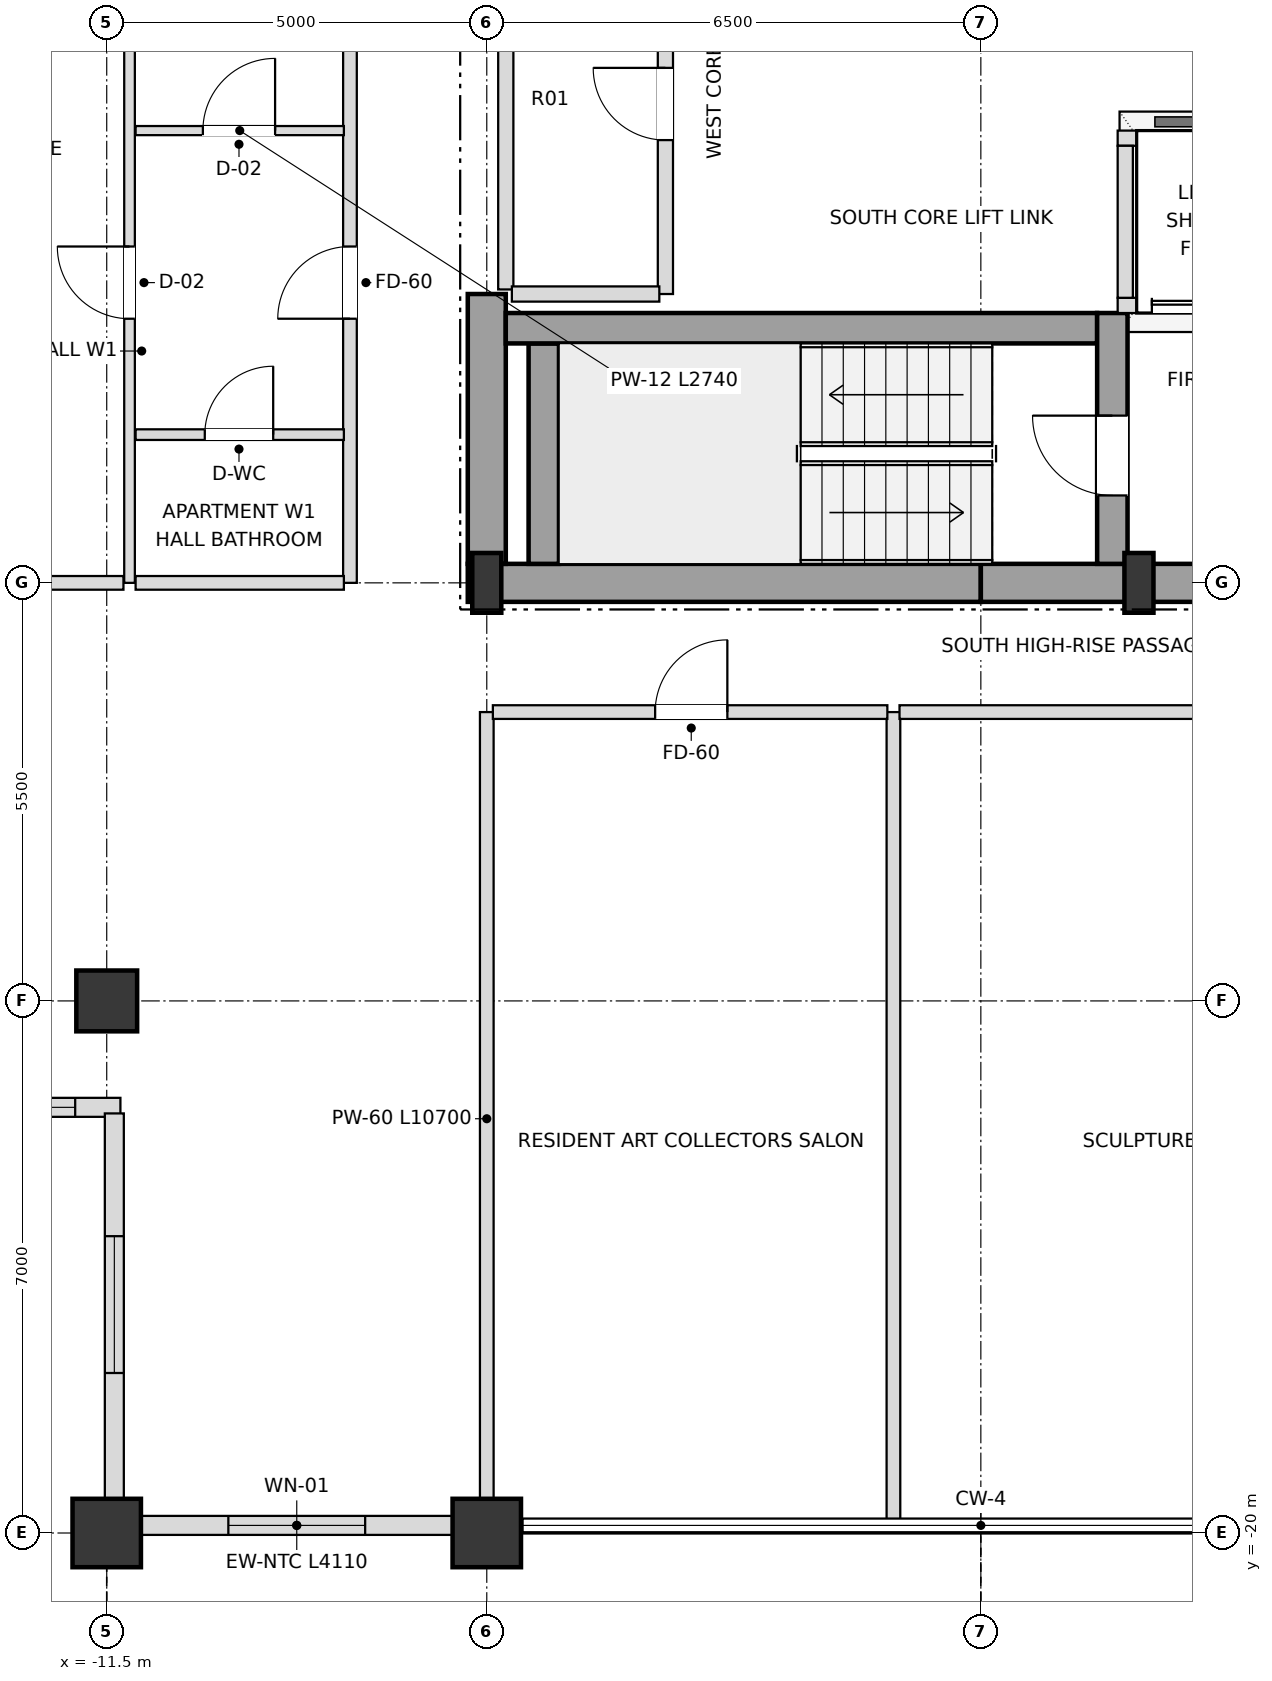
"""IFC4 building model, lengths in metres.
Left out: names, types, materials, properties, quantities, classifications, styles, units other than length and angle.
Written with IfcOpenShell. Run it as: python <this file> out.ifc"""

import sys

from ifc_helpers import new_model, si_unit, direction, frame, frame_2d, origin, origin_2d, place, context, subcontext, project, spatial, rectangle, i_section, extrude, element, fill, save


model = new_model("IFC4")
c1 = context("Model", 3, precision=1e-05, world=origin(), true_north=direction((0.0, 1.0)))
c2 = subcontext(c1, "Body", "Model", "MODEL_VIEW")
j1 = project(units=[si_unit("LENGTHUNIT", "METRE"), si_unit("PLANEANGLEUNIT", "RADIAN")], contexts=[c1])
p1 = place(None, origin())
s1 = spatial("IfcSite", under=j1, at=p1, CompositionType="ELEMENT")
p2 = place(p1, origin())
s2 = spatial("IfcBuilding", under=s1, at=p2, CompositionType="ELEMENT")
p3 = place(p2, frame((0.0, 0.0, 294.3)))
s3 = spatial("IfcBuildingStorey", under=s2, at=p3, CompositionType="ELEMENT", Elevation=294.3)
for number, where, z_axis, x_axis in (
    (1, (-6.5, -7.5, 0.0), (0.0, 0.0, 1.0), (1.0, 0.0, 0.0)),
    (2, (2.08, -7.5, 0.0), (0.0, 0.0, 1.0), (1.0, 0.0, 0.0)),
):
    element("IfcColumn", number, at=place(p3, frame(where, z_axis=z_axis, x_axis=x_axis)), inside=s3, PredefinedType="COLUMN", context=c2, shape_type="SweptSolid", body=[
        extrude(i_section(OverallWidth=0.382, OverallDepth=0.786, WebThickness=0.02, FlangeThickness=0.033, at=origin_2d()), origin(), (0.0, 0.0, 1.0), 3.6),
    ])
for number, where, z_axis, x_axis in (
    (3, (-11.5, -20.0, 0.0), (0.0, 0.0, 1.0), (1.0, 0.0, 0.0)),
    (4, (-6.5, -20.0, 0.0), (0.0, 0.0, 1.0), (1.0, 0.0, 0.0)),
):
    element("IfcColumn", number, at=place(p3, frame(where, z_axis=z_axis, x_axis=x_axis)), inside=s3, PredefinedType="USERDEFINED", context=c2, shape_type="SweptSolid", body=[
        extrude(rectangle(XDim=0.9, YDim=0.9, at=origin_2d()), origin(), (0.0, 0.0, 1.0), 3.6),
    ])
p4 = place(p3, frame((-11.5, -13.0, 0.0), z_axis=(0.0, 0.0, 1.0), x_axis=(1.0, 0.0, 0.0)))
e5 = element("IfcColumn", 5, at=p4, inside=s3, PredefinedType="COLUMN", context=c2, shape_type="SweptSolid", body=[
    extrude(rectangle(XDim=0.8, YDim=0.8, at=origin_2d()), origin(), (0.0, 0.0, 1.0), 3.6),
])
p5 = place(p3, frame((-11.055, -19.9, 0.0), z_axis=(0.0, 0.0, 1.0), x_axis=(1.0, 0.0, 0.0)))
e6 = element("IfcWall", 6, at=p5, inside=s3, PredefinedType="SOLIDWALL", context=c2, shape_type="SweptSolid", body=[
    extrude(rectangle(XDim=4.11, YDim=0.25, at=frame_2d((2.055, 0.0))), origin(), (0.0, 0.0, 1.0), 2.748),
])
p6 = place(p5, frame((1.155, 0.0, 0.72)))
e7 = element("IfcOpeningElement", 7, at=p6, cuts=e6, PredefinedType="OPENING", context=c2, shape_type="SweptSolid", body=[
    extrude(rectangle(XDim=1.8, YDim=1.68, at=frame_2d((0.9, 0.84))), frame((0.0, 0.135, 0.0), z_axis=(0.0, -1.0, 0.0), x_axis=(1.0, 0.0, 0.0)), (0.0, 0.0, 1.0), 0.27),
])
p7 = place(p3, frame((-16.98, -14.4, 0.0), z_axis=(0.0, 0.0, 1.0), x_axis=(1.0, 0.0, 0.0)))
e8 = element("IfcWall", 8, at=p7, inside=s3, PredefinedType="SOLIDWALL", context=c2, shape_type="SweptSolid", body=[
    extrude(rectangle(XDim=5.66, YDim=0.25, at=frame_2d((2.83, 0.0))), origin(), (0.0, 0.0, 1.0), 2.748),
])
p8 = place(p7, frame((0.595, 0.0, 0.72)))
e9 = element("IfcOpeningElement", 9, at=p8, cuts=e8, PredefinedType="OPENING", context=c2, shape_type="SweptSolid", body=[
    extrude(rectangle(XDim=1.8, YDim=1.68, at=frame_2d((0.9, 0.84))), frame((0.0, 0.135, 0.0), z_axis=(0.0, -1.0, 0.0), x_axis=(1.0, 0.0, 0.0)), (0.0, 0.0, 1.0), 0.27),
])
p9 = place(p7, frame((3.265, 0.0, 0.72)))
e10 = element("IfcOpeningElement", 10, at=p9, cuts=e8, PredefinedType="OPENING", context=c2, shape_type="SweptSolid", body=[
    extrude(rectangle(XDim=1.8, YDim=1.68, at=frame_2d((0.9, 0.84))), frame((0.0, 0.135, 0.0), z_axis=(0.0, -1.0, 0.0), x_axis=(1.0, 0.0, 0.0)), (0.0, 0.0, 1.0), 0.27),
])
p10 = place(p3, frame((-11.4, -14.48, 0.0), z_axis=(0.0, 0.0, 1.0), x_axis=(0.0, -1.0, 0.0)))
e11 = element("IfcWall", 11, at=p10, inside=s3, PredefinedType="SOLIDWALL", context=c2, shape_type="SweptSolid", body=[
    extrude(rectangle(XDim=5.34, YDim=0.25, at=frame_2d((2.67, 0.0))), origin(), (0.0, 0.0, 1.0), 2.748),
])
p11 = place(p10, frame((1.615, 0.0, 0.72)))
e12 = element("IfcOpeningElement", 12, at=p11, cuts=e11, PredefinedType="OPENING", context=c2, shape_type="SweptSolid", body=[
    extrude(rectangle(XDim=1.8, YDim=1.68, at=frame_2d((0.9, 0.84))), frame((0.0, 0.135, 0.0), z_axis=(0.0, -1.0, 0.0), x_axis=(1.0, 0.0, 0.0)), (0.0, 0.0, 1.0), 0.27),
])
for number, where, z_axis, x_axis in (
    (13, (-6.75, -7.5, 0.0), (0.0, 0.0, 1.0), (1.0, 0.0, 0.0)),
    (14, (0.0, -7.5, 0.0), (0.0, 0.0, 1.0), (1.0, 0.0, 0.0)),
):
    element("IfcWall", number, at=place(p3, frame(where, z_axis=z_axis, x_axis=x_axis)), inside=s3, PredefinedType="SHEAR", context=c2, shape_type="SweptSolid", body=[
        extrude(rectangle(XDim=6.75, YDim=0.5, at=frame_2d((3.375, 0.0))), origin(), (0.0, 0.0, 1.0), 3.38),
    ])
p12 = place(p3, frame((-6.5, -7.25, 0.0), z_axis=(0.0, 0.0, 1.0), x_axis=(0.0, 1.0, 0.0)))
e15 = element("IfcWall", 15, at=p12, inside=s3, PredefinedType="SHEAR", context=c2, shape_type="SweptSolid", body=[
    extrude(rectangle(XDim=3.55, YDim=0.5, at=frame_2d((1.775, 0.0))), origin(), (0.0, 0.0, 1.0), 3.38),
])
p13 = place(p3, frame((-5.75, -7.25, 0.0), z_axis=(0.0, 0.0, 1.0), x_axis=(0.0, 1.0, 0.0)))
e16 = element("IfcWall", 16, at=p13, inside=s3, PredefinedType="SHEAR", context=c2, shape_type="SweptSolid", body=[
    extrude(rectangle(XDim=2.9, YDim=0.4, at=frame_2d((1.45, 0.0))), origin(), (0.0, 0.0, 1.0), 3.38),
])
p14 = place(p3, frame((-6.25, -4.15, 0.0), z_axis=(0.0, 0.0, 1.0), x_axis=(1.0, 0.0, 0.0)))
e17 = element("IfcWall", 17, at=p14, inside=s3, PredefinedType="SHEAR", context=c2, shape_type="SweptSolid", body=[
    extrude(rectangle(XDim=7.78, YDim=0.4, at=frame_2d((3.89, 0.0))), origin(), (0.0, 0.0, 1.0), 3.38),
])
p15 = place(p3, frame((1.73, -7.25, 0.0), z_axis=(0.0, 0.0, 1.0), x_axis=(0.0, 1.0, 0.0)))
e18 = element("IfcWall", 18, at=p15, inside=s3, PredefinedType="SHEAR", context=c2, shape_type="SweptSolid", body=[
    extrude(rectangle(XDim=3.3, YDim=0.4, at=frame_2d((1.65, 0.0))), origin(), (0.0, 0.0, 1.0), 3.38),
])
p16 = place(p15, frame((0.9, 0.0, 0.0)))
e19 = element("IfcOpeningElement", 19, at=p16, cuts=e18, PredefinedType="OPENING", context=c2, shape_type="SweptSolid", body=[
    extrude(rectangle(XDim=1.05, YDim=2.15, at=frame_2d((0.525, 1.075))), frame((0.0, 0.21, 0.0), z_axis=(0.0, -1.0, 0.0), x_axis=(1.0, 0.0, 0.0)), (0.0, 0.0, 1.0), 0.42),
])
p17 = place(p3, frame((1.8, -3.85, 0.0), z_axis=(0.0, 0.0, 1.0), x_axis=(1.0, 0.0, 0.0)))
e20 = element("IfcWall", 20, at=p17, inside=s3, PredefinedType="SOLIDWALL", context=c2, shape_type="SweptSolid", body=[
    extrude(rectangle(XDim=4.1, YDim=0.2, at=frame_2d((2.05, 0.0))), origin(), (0.0, 0.0, 1.0), 3.38),
])
p18 = place(p17, frame((0.45, 0.0, 0.0)))
e21 = element("IfcOpeningElement", 21, at=p18, cuts=e20, PredefinedType="OPENING", context=c2, shape_type="SweptSolid", body=[
    extrude(rectangle(XDim=1.2, YDim=2.2, at=frame_2d((0.6, 1.1))), frame((0.0, 0.11, 0.0), z_axis=(0.0, -1.0, 0.0), x_axis=(1.0, 0.0, 0.0)), (0.0, 0.0, 1.0), 0.22),
])
p19 = place(p17, frame((2.45, 0.0, 0.0)))
e22 = element("IfcOpeningElement", 22, at=p19, cuts=e20, PredefinedType="OPENING", context=c2, shape_type="SweptSolid", body=[
    extrude(rectangle(XDim=1.2, YDim=2.2, at=frame_2d((0.6, 1.1))), frame((0.0, 0.11, 0.0), z_axis=(0.0, -1.0, 0.0), x_axis=(1.0, 0.0, 0.0)), (0.0, 0.0, 1.0), 0.22),
])
p20 = place(p3, frame((1.8, -1.65, 0.0), z_axis=(0.0, 0.0, 1.0), x_axis=(1.0, 0.0, 0.0)))
e23 = element("IfcWall", 23, at=p20, inside=s3, PredefinedType="SOLIDWALL", context=c2, shape_type="SweptSolid", body=[
    extrude(rectangle(XDim=4.1, YDim=0.2, at=frame_2d((2.05, 0.0))), origin(), (0.0, 0.0, 1.0), 3.38),
])
p21 = place(p3, frame((1.9, -3.75, 0.0), z_axis=(0.0, 0.0, 1.0), x_axis=(0.0, 1.0, 0.0)))
e24 = element("IfcWall", 24, at=p21, inside=s3, PredefinedType="SOLIDWALL", context=c2, shape_type="SweptSolid", body=[
    extrude(rectangle(XDim=2.0, YDim=0.2, at=frame_2d((1.0, 0.0))), origin(), (0.0, 0.0, 1.0), 3.38),
])
p22 = place(p3, frame((-11.2, -7.5, 0.0), z_axis=(0.0, 0.0, 1.0), x_axis=(0.0, 1.0, 0.0)))
e25 = element("IfcWall", 25, at=p22, inside=s3, PredefinedType="PARTITIONING", context=c2, shape_type="SweptSolid", body=[
    extrude(rectangle(XDim=15.0, YDim=0.14, at=frame_2d((7.5, 0.0))), origin(), (0.0, 0.0, 1.0), 3.38),
])
p23 = place(p22, frame((3.475, 0.0, 0.0)))
e26 = element("IfcOpeningElement", 26, at=p23, cuts=e25, PredefinedType="OPENING", context=c2, shape_type="SweptSolid", body=[
    extrude(rectangle(XDim=0.95, YDim=2.1, at=frame_2d((0.475, 1.05))), frame((0.0, 0.08, 0.0), z_axis=(0.0, -1.0, 0.0), x_axis=(1.0, 0.0, 0.0)), (0.0, 0.0, 1.0), 0.16),
])
p24 = place(p3, frame((-8.3, -7.5, 0.0), z_axis=(0.0, 0.0, 1.0), x_axis=(0.0, 1.0, 0.0)))
e27 = element("IfcWall", 27, at=p24, inside=s3, PredefinedType="PARTITIONING", context=c2, shape_type="SweptSolid", body=[
    extrude(rectangle(XDim=15.0, YDim=0.18, at=frame_2d((7.5, 0.0))), origin(), (0.0, 0.0, 1.0), 3.38),
])
p25 = place(p24, frame((3.475, 0.0, 0.0)))
e28 = element("IfcOpeningElement", 28, at=p25, cuts=e27, PredefinedType="OPENING", context=c2, shape_type="SweptSolid", body=[
    extrude(rectangle(XDim=0.95, YDim=2.15, at=frame_2d((0.475, 1.075))), frame((0.0, 0.1, 0.0), z_axis=(0.0, -1.0, 0.0), x_axis=(1.0, 0.0, 0.0)), (0.0, 0.0, 1.0), 0.2),
])
p26 = place(p3, frame((-6.5, -19.9, 0.0), z_axis=(0.0, 0.0, 1.0), x_axis=(0.0, 1.0, 0.0)))
e29 = element("IfcWall", 29, at=p26, inside=s3, PredefinedType="PARTITIONING", context=c2, shape_type="SweptSolid", body=[
    extrude(rectangle(XDim=10.7, YDim=0.18, at=frame_2d((5.35, 0.0))), origin(), (0.0, 0.0, 1.0), 2.826),
])
p27 = place(p3, frame((-6.25, -3.64, 0.0), z_axis=(0.0, 0.0, 1.0), x_axis=(0.0, 1.0, 0.0)))
e30 = element("IfcWall", 30, at=p27, inside=s3, PredefinedType="SOLIDWALL", context=c2, shape_type="SweptSolid", body=[
    extrude(rectangle(XDim=7.34, YDim=0.2, at=frame_2d((3.67, 0.0))), origin(), (0.0, 0.0, 1.0), 3.38),
])
p28 = place(p3, frame((-4.15, -3.7, 0.0), z_axis=(0.0, 0.0, 1.0), x_axis=(0.0, 1.0, 0.0)))
e31 = element("IfcWall", 31, at=p28, inside=s3, PredefinedType="SOLIDWALL", context=c2, shape_type="SweptSolid", body=[
    extrude(rectangle(XDim=7.4, YDim=0.2, at=frame_2d((3.7, 0.0))), origin(), (0.0, 0.0, 1.0), 3.38),
])
p29 = place(p28, frame((2.025, 0.0, 0.0)))
e32 = element("IfcOpeningElement", 32, at=p29, cuts=e31, PredefinedType="OPENING", context=c2, shape_type="SweptSolid", body=[
    extrude(rectangle(XDim=0.95, YDim=2.15, at=frame_2d((0.475, 1.075))), frame((0.0, 0.11, 0.0), z_axis=(0.0, -1.0, 0.0), x_axis=(1.0, 0.0, 0.0)), (0.0, 0.0, 1.0), 0.22),
])
p30 = place(p28, frame((5.775, 0.0, 0.0)))
e33 = element("IfcOpeningElement", 33, at=p30, cuts=e31, PredefinedType="OPENING", context=c2, shape_type="SweptSolid", body=[
    extrude(rectangle(XDim=0.95, YDim=2.15, at=frame_2d((0.475, 1.075))), frame((0.0, 0.11, 0.0), z_axis=(0.0, -1.0, 0.0), x_axis=(1.0, 0.0, 0.0)), (0.0, 0.0, 1.0), 0.22),
])
p31 = place(p3, frame((-1.15, -19.9, 0.0), z_axis=(0.0, 0.0, 1.0), x_axis=(0.0, 1.0, 0.0)))
e34 = element("IfcWall", 34, at=p31, inside=s3, PredefinedType="PARTITIONING", context=c2, shape_type="SweptSolid", body=[
    extrude(rectangle(XDim=10.7, YDim=0.18, at=frame_2d((5.35, 0.0))), origin(), (0.0, 0.0, 1.0), 3.018),
])
p32 = place(p3, frame((-6.42, -9.2, 0.0), z_axis=(0.0, 0.0, 1.0), x_axis=(1.0, 0.0, 0.0)))
e35 = element("IfcWall", 35, at=p32, inside=s3, PredefinedType="PARTITIONING", context=c2, shape_type="SweptSolid", body=[
    extrude(rectangle(XDim=5.19, YDim=0.18, at=frame_2d((2.595, 0.0))), origin(), (0.0, 0.0, 1.0), 3.38),
])
p33 = place(p32, frame((2.135, 0.0, 0.0)))
e36 = element("IfcOpeningElement", 36, at=p33, cuts=e35, PredefinedType="OPENING", context=c2, shape_type="SweptSolid", body=[
    extrude(rectangle(XDim=0.95, YDim=2.15, at=frame_2d((0.475, 1.075))), frame((0.0, 0.1, 0.0), z_axis=(0.0, -1.0, 0.0), x_axis=(1.0, 0.0, 0.0)), (0.0, 0.0, 1.0), 0.2),
])
p34 = place(p3, frame((-1.07, -9.2, 0.0), z_axis=(0.0, 0.0, 1.0), x_axis=(1.0, 0.0, 0.0)))
e37 = element("IfcWall", 37, at=p34, inside=s3, PredefinedType="PARTITIONING", context=c2, shape_type="SweptSolid", body=[
    extrude(rectangle(XDim=9.79, YDim=0.18, at=frame_2d((4.895, 0.0))), origin(), (0.0, 0.0, 1.0), 2.826),
])
p35 = place(p34, frame((4.435, 0.0, 0.0)))
e38 = element("IfcOpeningElement", 38, at=p35, cuts=e37, PredefinedType="OPENING", context=c2, shape_type="SweptSolid", body=[
    extrude(rectangle(XDim=0.95, YDim=2.15, at=frame_2d((0.475, 1.075))), frame((0.0, 0.1, 0.0), z_axis=(0.0, -1.0, 0.0), x_axis=(1.0, 0.0, 0.0)), (0.0, 0.0, 1.0), 0.2),
])
p36 = place(p3, frame((-16.9, -7.5, 0.0), z_axis=(0.0, 0.0, 1.0), x_axis=(1.0, 0.0, 0.0)))
e39 = element("IfcWall", 39, at=p36, inside=s3, PredefinedType="PARTITIONING", context=c2, shape_type="SweptSolid", body=[
    extrude(rectangle(XDim=5.62, YDim=0.18, at=frame_2d((2.81, 0.0))), origin(), (0.0, 0.0, 1.0), 2.826),
])
p37 = place(p3, frame((-11.12, -7.5, 0.0), z_axis=(0.0, 0.0, 1.0), x_axis=(1.0, 0.0, 0.0)))
e40 = element("IfcWall", 40, at=p37, inside=s3, PredefinedType="PARTITIONING", context=c2, shape_type="SweptSolid", body=[
    extrude(rectangle(XDim=2.74, YDim=0.18, at=frame_2d((1.37, 0.0))), origin(), (0.0, 0.0, 1.0), 2.826),
])
p38 = place(p3, frame((-11.12, -5.55, 0.0), z_axis=(0.0, 0.0, 1.0), x_axis=(1.0, 0.0, 0.0)))
e41 = element("IfcWall", 41, at=p38, inside=s3, PredefinedType="PARTITIONING", context=c2, shape_type="SweptSolid", body=[
    extrude(rectangle(XDim=2.74, YDim=0.14, at=frame_2d((1.37, 0.0))), origin(), (0.0, 0.0, 1.0), 3.38),
])
p39 = place(p38, frame((0.91, 0.0, 0.0)))
e42 = element("IfcOpeningElement", 42, at=p39, cuts=e41, PredefinedType="OPENING", context=c2, shape_type="SweptSolid", body=[
    extrude(rectangle(XDim=0.9, YDim=2.1, at=frame_2d((0.45, 1.05))), frame((0.0, 0.08, 0.0), z_axis=(0.0, -1.0, 0.0), x_axis=(1.0, 0.0, 0.0)), (0.0, 0.0, 1.0), 0.16),
])
p40 = place(p3, frame((-6.17, -3.7, 0.0), z_axis=(0.0, 0.0, 1.0), x_axis=(1.0, 0.0, 0.0)))
e43 = element("IfcWall", 43, at=p40, inside=s3, PredefinedType="SOLIDWALL", context=c2, shape_type="SweptSolid", body=[
    extrude(rectangle(XDim=1.94, YDim=0.2, at=frame_2d((0.97, 0.0))), origin(), (0.0, 0.0, 1.0), 3.38),
])
p41 = place(p3, frame((-11.12, -1.55, 0.0), z_axis=(0.0, 0.0, 1.0), x_axis=(1.0, 0.0, 0.0)))
e44 = element("IfcWall", 44, at=p41, inside=s3, PredefinedType="PARTITIONING", context=c2, shape_type="SweptSolid", body=[
    extrude(rectangle(XDim=2.74, YDim=0.12, at=frame_2d((1.37, 0.0))), origin(), (0.0, 0.0, 1.0), 3.38),
])
p42 = place(p41, frame((0.885, 0.0, 0.0)))
e45 = element("IfcOpeningElement", 45, at=p42, cuts=e44, PredefinedType="OPENING", context=c2, shape_type="SweptSolid", body=[
    extrude(rectangle(XDim=0.95, YDim=2.1, at=frame_2d((0.475, 1.05))), frame((0.0, 0.07, 0.0), z_axis=(0.0, -1.0, 0.0), x_axis=(1.0, 0.0, 0.0)), (0.0, 0.0, 1.0), 0.14),
])
p43 = place(p6, origin())
e46 = element("IfcWindow", 46, at=p43, inside=s3, PartitioningType="SINGLE_PANEL", PredefinedType="WINDOW", context=c2, shape_type="SweptSolid", body=[
    extrude(rectangle(XDim=1.8, YDim=1.68, at=frame_2d((0.9, 0.84))), frame((0.0, 0.03, 0.0), z_axis=(0.0, -1.0, 0.0), x_axis=(1.0, 0.0, 0.0)), (0.0, 0.0, 1.0), 0.06),
])
fill(e7, e46)
p44 = place(p9, origin())
e47 = element("IfcWindow", 47, at=p44, inside=s3, PartitioningType="SINGLE_PANEL", PredefinedType="WINDOW", context=c2, shape_type="SweptSolid", body=[
    extrude(rectangle(XDim=1.8, YDim=1.68, at=frame_2d((0.9, 0.84))), frame((0.0, 0.03, 0.0), z_axis=(0.0, -1.0, 0.0), x_axis=(1.0, 0.0, 0.0)), (0.0, 0.0, 1.0), 0.06),
])
fill(e10, e47)
p45 = place(p11, origin())
e48 = element("IfcWindow", 48, at=p45, inside=s3, PartitioningType="SINGLE_PANEL", PredefinedType="WINDOW", context=c2, shape_type="SweptSolid", body=[
    extrude(rectangle(XDim=1.8, YDim=1.68, at=frame_2d((0.9, 0.84))), frame((0.0, 0.03, 0.0), z_axis=(0.0, -1.0, 0.0), x_axis=(1.0, 0.0, 0.0)), (0.0, 0.0, 1.0), 0.06),
])
fill(e12, e48)
p46 = place(p16, origin())
e49 = element("IfcDoor", 49, at=p46, inside=s3, OperationType="SINGLE_SWING_RIGHT", PredefinedType="DOOR", context=c2, shape_type="SweptSolid", body=[
    extrude(rectangle(XDim=1.05, YDim=2.15, at=frame_2d((0.525, 1.075))), frame((0.0, 0.025, 0.0), z_axis=(0.0, -1.0, 0.0), x_axis=(1.0, 0.0, 0.0)), (0.0, 0.0, 1.0), 0.05),
])
fill(e19, e49)
p47 = place(p18, origin())
e50 = element("IfcDoor", 50, at=p47, inside=s3, OperationType="DOUBLE_DOOR_SLIDING", PredefinedType="DOOR", context=c2, shape_type="SweptSolid", body=[
    extrude(rectangle(XDim=1.2, YDim=2.2, at=frame_2d((0.6, 1.1))), frame((0.0, 0.025, 0.0), z_axis=(0.0, -1.0, 0.0), x_axis=(1.0, 0.0, 0.0)), (0.0, 0.0, 1.0), 0.05),
])
fill(e21, e50)
p48 = place(p29, origin())
e51 = element("IfcDoor", 51, at=p48, inside=s3, OperationType="SINGLE_SWING_RIGHT", PredefinedType="DOOR", context=c2, shape_type="SweptSolid", body=[
    extrude(rectangle(XDim=0.95, YDim=2.15, at=frame_2d((0.475, 1.075))), frame((0.0, 0.025, 0.0), z_axis=(0.0, -1.0, 0.0), x_axis=(1.0, 0.0, 0.0)), (0.0, 0.0, 1.0), 0.05),
])
fill(e32, e51)
p49 = place(p33, origin())
e52 = element("IfcDoor", 52, at=p49, inside=s3, OperationType="SINGLE_SWING_RIGHT", PredefinedType="DOOR", context=c2, shape_type="SweptSolid", body=[
    extrude(rectangle(XDim=0.95, YDim=2.15, at=frame_2d((0.475, 1.075))), frame((0.0, 0.025, 0.0), z_axis=(0.0, -1.0, 0.0), x_axis=(1.0, 0.0, 0.0)), (0.0, 0.0, 1.0), 0.05),
])
fill(e36, e52)
p50 = place(p39, origin())
e53 = element("IfcDoor", 53, at=p50, inside=s3, OperationType="SINGLE_SWING_RIGHT", PredefinedType="DOOR", context=c2, shape_type="SweptSolid", body=[
    extrude(rectangle(XDim=0.9, YDim=2.1, at=frame_2d((0.45, 1.05))), frame((0.0, 0.025, 0.0), z_axis=(0.0, -1.0, 0.0), x_axis=(1.0, 0.0, 0.0)), (0.0, 0.0, 1.0), 0.05),
])
fill(e42, e53)
p51 = place(p25, origin())
e54 = element("IfcDoor", 54, at=p51, inside=s3, OperationType="SINGLE_SWING_LEFT", PredefinedType="DOOR", context=c2, shape_type="SweptSolid", body=[
    extrude(rectangle(XDim=0.95, YDim=2.15, at=frame_2d((0.475, 1.075))), frame((0.0, 0.025, 0.0), z_axis=(0.0, -1.0, 0.0), x_axis=(1.0, 0.0, 0.0)), (0.0, 0.0, 1.0), 0.05),
])
fill(e28, e54)
p52 = place(p42, origin())
e55 = element("IfcDoor", 55, at=p52, inside=s3, OperationType="SINGLE_SWING_RIGHT", PredefinedType="DOOR", context=c2, shape_type="SweptSolid", body=[
    extrude(rectangle(XDim=0.95, YDim=2.1, at=frame_2d((0.475, 1.05))), frame((0.0, 0.025, 0.0), z_axis=(0.0, -1.0, 0.0), x_axis=(1.0, 0.0, 0.0)), (0.0, 0.0, 1.0), 0.05),
])
fill(e45, e55)
p53 = place(p23, origin())
e56 = element("IfcDoor", 56, at=p53, inside=s3, OperationType="SINGLE_SWING_RIGHT", PredefinedType="DOOR", context=c2, shape_type="SweptSolid", body=[
    extrude(rectangle(XDim=0.95, YDim=2.1, at=frame_2d((0.475, 1.05))), frame((0.0, 0.025, 0.0), z_axis=(0.0, -1.0, 0.0), x_axis=(1.0, 0.0, 0.0)), (0.0, 0.0, 1.0), 0.05),
])
fill(e26, e56)
save(model, sys.argv[1])
